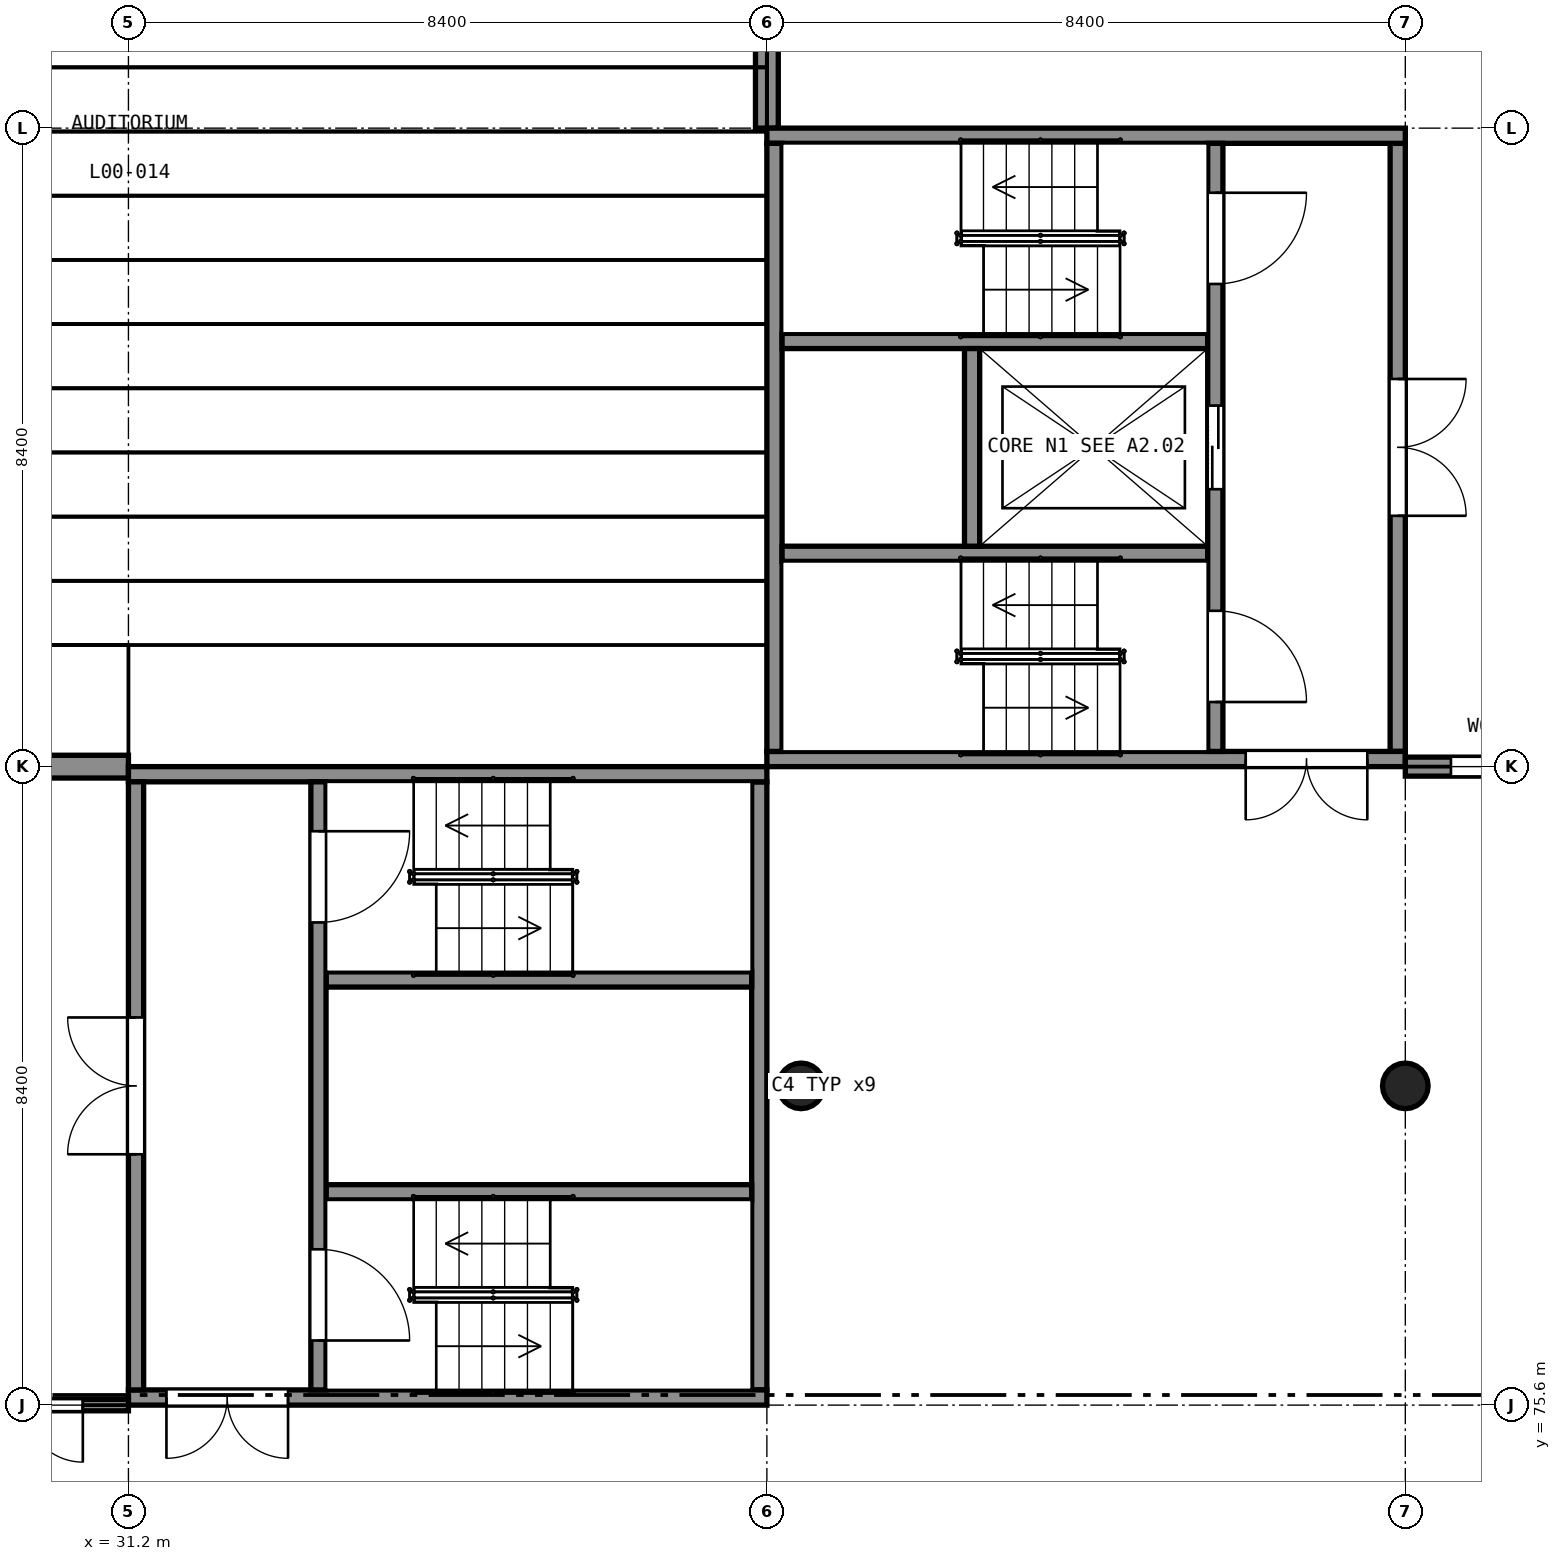
"""IFC4 building model, lengths in metres.
Left out: names, types, materials, properties, quantities, classifications, styles, units other than length and angle.
Written with IfcOpenShell. Run it as: python <this file> out.ifc"""

import sys

from ifc_helpers import new_model, si_unit, direction, frame, frame_2d, origin, origin_2d, place, context, subcontext, project, spatial, rectangle, circle, extrude, element, fill, save


model = new_model("IFC4")
c1 = context("Model", 3, precision=1e-05, world=origin(), true_north=direction((0.0, 1.0)))
c2 = subcontext(c1, "Body", "Model", "MODEL_VIEW")
j1 = project(units=[si_unit("LENGTHUNIT", "METRE"), si_unit("PLANEANGLEUNIT", "RADIAN")], contexts=[c1])
p1 = place(None, origin())
s1 = spatial("IfcSite", under=j1, at=p1, CompositionType="ELEMENT")
p2 = place(p1, origin())
s2 = spatial("IfcBuilding", under=s1, at=p2, CompositionType="ELEMENT")
p3 = place(p2, origin())
s3 = spatial("IfcBuildingStorey", under=s2, at=p3, CompositionType="ELEMENT", Elevation=0.0)
p4 = place(p3, frame((39.6, 75.7, -1.8), z_axis=(0.0, 0.0, 1.0), x_axis=(-1.0, 0.0, 0.0)))
e1 = element("IfcWall", 1, at=p4, inside=s3, PredefinedType="SHEAR", context=c2, shape_type="SweptSolid", body=[
    extrude(rectangle(XDim=8.4, YDim=0.2, at=frame_2d((4.2, 0.0))), origin(), (0.0, 0.0, 1.0), 7.3),
])
p5 = place(p4, frame((6.3, 0.0, 1.8)))
e2 = element("IfcOpeningElement", 2, at=p5, cuts=e1, PredefinedType="OPENING", context=c2, shape_type="SweptSolid", body=[
    extrude(rectangle(XDim=1.6, YDim=2.1, at=frame_2d((0.8, 1.05))), frame((0.0, 0.11, 0.0), z_axis=(0.0, -1.0, 0.0), x_axis=(1.0, 0.0, 0.0)), (0.0, 0.0, 1.0), 0.22),
])
p6 = place(p3, frame((31.2, 83.9, -1.8), z_axis=(0.0, 0.0, 1.0), x_axis=(1.0, 0.0, 0.0)))
e3 = element("IfcWall", 3, at=p6, inside=s3, PredefinedType="SHEAR", context=c2, shape_type="SweptSolid", body=[
    extrude(rectangle(XDim=8.4, YDim=0.2, at=frame_2d((4.2, 0.0))), origin(), (0.0, 0.0, 1.0), 7.3),
])
p7 = place(p3, frame((31.3, 75.8, -1.8), z_axis=(0.0, 0.0, 1.0), x_axis=(0.0, 1.0, 0.0)))
e4 = element("IfcWall", 4, at=p7, inside=s3, PredefinedType="SHEAR", context=c2, shape_type="SweptSolid", body=[
    extrude(rectangle(XDim=8.0, YDim=0.2, at=frame_2d((4.0, 0.0))), origin(), (0.0, 0.0, 1.0), 7.3),
])
p8 = place(p7, frame((3.1, 0.0, 1.8)))
e5 = element("IfcOpeningElement", 5, at=p8, cuts=e4, PredefinedType="OPENING", context=c2, shape_type="SweptSolid", body=[
    extrude(rectangle(XDim=1.8, YDim=2.1, at=frame_2d((0.9, 1.05))), frame((0.0, 0.11, 0.0), z_axis=(0.0, -1.0, 0.0), x_axis=(1.0, 0.0, 0.0)), (0.0, 0.0, 1.0), 0.22),
])
p9 = place(p3, frame((39.5, 75.8, -1.8), z_axis=(0.0, 0.0, 1.0), x_axis=(0.0, 1.0, 0.0)))
e6 = element("IfcWall", 6, at=p9, inside=s3, PredefinedType="SHEAR", context=c2, shape_type="SweptSolid", body=[
    extrude(rectangle(XDim=8.0, YDim=0.2, at=frame_2d((4.0, 0.0))), origin(), (0.0, 0.0, 1.0), 7.3),
])
p10 = place(p3, frame((33.7, 75.8, -1.8), z_axis=(0.0, 0.0, 1.0), x_axis=(0.0, 1.0, 0.0)))
e7 = element("IfcWall", 7, at=p10, inside=s3, PredefinedType="SHEAR", context=c2, shape_type="SweptSolid", body=[
    extrude(rectangle(XDim=8.0, YDim=0.2, at=frame_2d((4.0, 0.0))), origin(), (0.0, 0.0, 1.0), 7.3),
])
p11 = place(p10, frame((0.65, 0.0, 1.8)))
e8 = element("IfcOpeningElement", 8, at=p11, cuts=e7, PredefinedType="OPENING", context=c2, shape_type="SweptSolid", body=[
    extrude(rectangle(XDim=1.2, YDim=2.1, at=frame_2d((0.6, 1.05))), frame((0.0, 0.11, 0.0), z_axis=(0.0, -1.0, 0.0), x_axis=(1.0, 0.0, 0.0)), (0.0, 0.0, 1.0), 0.22),
])
p12 = place(p10, frame((6.15, 0.0, 1.8)))
e9 = element("IfcOpeningElement", 9, at=p12, cuts=e7, PredefinedType="OPENING", context=c2, shape_type="SweptSolid", body=[
    extrude(rectangle(XDim=1.2, YDim=2.1, at=frame_2d((0.6, 1.05))), frame((0.0, 0.11, 0.0), z_axis=(0.0, -1.0, 0.0), x_axis=(1.0, 0.0, 0.0)), (0.0, 0.0, 1.0), 0.22),
])
for number, where, z_axis, x_axis in (
    (10, (33.8, 78.4, -1.8), (0.0, 0.0, 1.0), (1.0, 0.0, 0.0)),
    (11, (33.8, 81.2, -1.8), (0.0, 0.0, 1.0), (1.0, 0.0, 0.0)),
):
    element("IfcWall", number, at=place(p3, frame(where, z_axis=z_axis, x_axis=x_axis)), inside=s3, PredefinedType="SHEAR", context=c2, shape_type="SweptSolid", body=[
        extrude(rectangle(XDim=5.6, YDim=0.2, at=frame_2d((2.8, 0.0))), origin(), (0.0, 0.0, 1.0), 7.3),
    ])
p13 = place(p3, frame((48.0, 84.1, -1.8), z_axis=(0.0, 0.0, 1.0), x_axis=(-1.0, 0.0, 0.0)))
e12 = element("IfcWall", 12, at=p13, inside=s3, PredefinedType="SHEAR", context=c2, shape_type="SweptSolid", body=[
    extrude(rectangle(XDim=8.4, YDim=0.2, at=frame_2d((4.2, 0.0))), origin(), (0.0, 0.0, 1.0), 7.3),
])
p14 = place(p13, frame((0.5, 0.0, 1.8)))
e13 = element("IfcOpeningElement", 13, at=p14, cuts=e12, PredefinedType="OPENING", context=c2, shape_type="SweptSolid", body=[
    extrude(rectangle(XDim=1.6, YDim=2.1, at=frame_2d((0.8, 1.05))), frame((0.0, 0.11, 0.0), z_axis=(0.0, -1.0, 0.0), x_axis=(1.0, 0.0, 0.0)), (0.0, 0.0, 1.0), 0.22),
])
p15 = place(p3, frame((39.6, 92.3, -1.8), z_axis=(0.0, 0.0, 1.0), x_axis=(1.0, 0.0, 0.0)))
e14 = element("IfcWall", 14, at=p15, inside=s3, PredefinedType="SHEAR", context=c2, shape_type="SweptSolid", body=[
    extrude(rectangle(XDim=8.4, YDim=0.2, at=frame_2d((4.2, 0.0))), origin(), (0.0, 0.0, 1.0), 7.3),
])
p16 = place(p3, frame((39.7, 84.2, -1.8), z_axis=(0.0, 0.0, 1.0), x_axis=(0.0, 1.0, 0.0)))
e15 = element("IfcWall", 15, at=p16, inside=s3, PredefinedType="SHEAR", context=c2, shape_type="SweptSolid", body=[
    extrude(rectangle(XDim=8.0, YDim=0.2, at=frame_2d((4.0, 0.0))), origin(), (0.0, 0.0, 1.0), 7.3),
])
p17 = place(p3, frame((47.9, 84.2, -1.8), z_axis=(0.0, 0.0, 1.0), x_axis=(0.0, 1.0, 0.0)))
e16 = element("IfcWall", 16, at=p17, inside=s3, PredefinedType="SHEAR", context=c2, shape_type="SweptSolid", body=[
    extrude(rectangle(XDim=8.0, YDim=0.2, at=frame_2d((4.0, 0.0))), origin(), (0.0, 0.0, 1.0), 7.3),
])
p18 = place(p17, frame((3.1, 0.0, 1.8)))
e17 = element("IfcOpeningElement", 17, at=p18, cuts=e16, PredefinedType="OPENING", context=c2, shape_type="SweptSolid", body=[
    extrude(rectangle(XDim=1.8, YDim=2.1, at=frame_2d((0.9, 1.05))), frame((0.0, 0.11, 0.0), z_axis=(0.0, -1.0, 0.0), x_axis=(1.0, 0.0, 0.0)), (0.0, 0.0, 1.0), 0.22),
])
p19 = place(p3, frame((45.5, 84.2, -1.8), z_axis=(0.0, 0.0, 1.0), x_axis=(0.0, 1.0, 0.0)))
e18 = element("IfcWall", 18, at=p19, inside=s3, PredefinedType="SHEAR", context=c2, shape_type="SweptSolid", body=[
    extrude(rectangle(XDim=8.0, YDim=0.2, at=frame_2d((4.0, 0.0))), origin(), (0.0, 0.0, 1.0), 7.3),
])
p20 = place(p19, frame((0.65, 0.0, 1.8)))
e19 = element("IfcOpeningElement", 19, at=p20, cuts=e18, PredefinedType="OPENING", context=c2, shape_type="SweptSolid", body=[
    extrude(rectangle(XDim=1.2, YDim=2.1, at=frame_2d((0.6, 1.05))), frame((0.0, 0.11, 0.0), z_axis=(0.0, -1.0, 0.0), x_axis=(1.0, 0.0, 0.0)), (0.0, 0.0, 1.0), 0.22),
])
p21 = place(p19, frame((6.15, 0.0, 1.8)))
e20 = element("IfcOpeningElement", 20, at=p21, cuts=e18, PredefinedType="OPENING", context=c2, shape_type="SweptSolid", body=[
    extrude(rectangle(XDim=1.2, YDim=2.1, at=frame_2d((0.6, 1.05))), frame((0.0, 0.11, 0.0), z_axis=(0.0, -1.0, 0.0), x_axis=(1.0, 0.0, 0.0)), (0.0, 0.0, 1.0), 0.22),
])
p22 = place(p19, frame((3.45, 0.0, 1.8)))
e21 = element("IfcOpeningElement", 21, at=p22, cuts=e18, PredefinedType="OPENING", context=c2, shape_type="SweptSolid", body=[
    extrude(rectangle(XDim=1.1, YDim=2.1, at=frame_2d((0.55, 1.05))), frame((0.0, 0.11, 0.0), z_axis=(0.0, -1.0, 0.0), x_axis=(1.0, 0.0, 0.0)), (0.0, 0.0, 1.0), 0.22),
])
for number, where, z_axis, x_axis in (
    (22, (39.8, 86.8, -1.8), (0.0, 0.0, 1.0), (1.0, 0.0, 0.0)),
    (23, (39.8, 89.6, -1.8), (0.0, 0.0, 1.0), (1.0, 0.0, 0.0)),
):
    element("IfcWall", number, at=place(p3, frame(where, z_axis=z_axis, x_axis=x_axis)), inside=s3, PredefinedType="SHEAR", context=c2, shape_type="SweptSolid", body=[
        extrude(rectangle(XDim=5.6, YDim=0.2, at=frame_2d((2.8, 0.0))), origin(), (0.0, 0.0, 1.0), 7.3),
    ])
p23 = place(p3, frame((42.3, 86.9, -1.8), z_axis=(0.0, 0.0, 1.0), x_axis=(0.0, 1.0, 0.0)))
e24 = element("IfcWall", 24, at=p23, inside=s3, PredefinedType="SHEAR", context=c2, shape_type="SweptSolid", body=[
    extrude(rectangle(XDim=2.6, YDim=0.2, at=frame_2d((1.3, 0.0))), origin(), (0.0, 0.0, 1.0), 7.3),
])
for number, where, z_axis, x_axis in (
    (25, (40.05, 79.8, -0.3), (0.0, 0.0, 1.0), (1.0, 0.0, 0.0)),
    (26, (48.0, 79.8, -0.3), (0.0, 0.0, 1.0), (1.0, 0.0, 0.0)),
):
    element("IfcColumn", number, at=place(p3, frame(where, z_axis=z_axis, x_axis=x_axis)), inside=s3, PredefinedType="COLUMN", context=c2, shape_type="SweptSolid", body=[
        extrude(circle(Radius=0.3, at=origin_2d()), origin(), (0.0, 0.0, 1.0), 5.8),
    ])
p24 = place(p3, frame((22.8, 75.6, 0.0), z_axis=(0.0, 0.0, 1.0), x_axis=(1.0, 0.0, 0.0)))
e27 = element("IfcWall", 27, at=p24, inside=s3, PredefinedType="ELEMENTEDWALL", context=c2, shape_type="SweptSolid", body=[
    extrude(rectangle(XDim=8.4, YDim=0.15, at=frame_2d((4.2, 0.0))), origin(), (0.0, 0.0, 1.0), 4.44),
])
p25 = place(p24, frame((4.8, 0.0, 0.0)))
e28 = element("IfcOpeningElement", 28, at=p25, cuts=e27, PredefinedType="OPENING", context=c2, shape_type="SweptSolid", body=[
    extrude(rectangle(XDim=1.5, YDim=2.4, at=frame_2d((0.75, 1.2))), frame((0.0, 0.085, 0.0), z_axis=(0.0, -1.0, 0.0), x_axis=(1.0, 0.0, 0.0)), (0.0, 0.0, 1.0), 0.17),
])
p26 = place(p24, frame((4.8, 0.0, 2.6)))
e29 = element("IfcOpeningElement", 29, at=p26, cuts=e27, PredefinedType="OPENING", context=c2, shape_type="SweptSolid", body=[
    extrude(rectangle(XDim=1.5, YDim=1.74, at=frame_2d((0.75, 0.87))), frame((0.0, 0.085, 0.0), z_axis=(0.0, -1.0, 0.0), x_axis=(1.0, 0.0, 0.0)), (0.0, 0.0, 1.0), 0.17),
])
p27 = place(p24, frame((6.3, 0.0, 0.0)))
e30 = element("IfcOpeningElement", 30, at=p27, cuts=e27, PredefinedType="OPENING", context=c2, shape_type="SweptSolid", body=[
    extrude(rectangle(XDim=1.5, YDim=2.4, at=frame_2d((0.75, 1.2))), frame((0.0, 0.085, 0.0), z_axis=(0.0, -1.0, 0.0), x_axis=(1.0, 0.0, 0.0)), (0.0, 0.0, 1.0), 0.17),
])
p28 = place(p24, frame((6.3, 0.0, 2.6)))
e31 = element("IfcOpeningElement", 31, at=p28, cuts=e27, PredefinedType="OPENING", context=c2, shape_type="SweptSolid", body=[
    extrude(rectangle(XDim=1.5, YDim=1.74, at=frame_2d((0.75, 0.87))), frame((0.0, 0.085, 0.0), z_axis=(0.0, -1.0, 0.0), x_axis=(1.0, 0.0, 0.0)), (0.0, 0.0, 1.0), 0.17),
])
p29 = place(p3, frame((48.0, 84.0, 0.0), z_axis=(0.0, 0.0, 1.0), x_axis=(1.0, 0.0, 0.0)))
e32 = element("IfcWall", 32, at=p29, inside=s3, PredefinedType="SOLIDWALL", context=c2, shape_type="SweptSolid", body=[
    extrude(rectangle(XDim=8.0, YDim=0.25, at=frame_2d((4.0, 0.0))), origin(), (0.0, 0.0, 1.0), 4.44),
])
p30 = place(p29, frame((0.6, 0.0, 0.9)))
e33 = element("IfcOpeningElement", 33, at=p30, cuts=e32, PredefinedType="OPENING", context=c2, shape_type="SweptSolid", body=[
    extrude(rectangle(XDim=1.2, YDim=2.1, at=frame_2d((0.6, 1.05))), frame((0.0, 0.135, 0.0), z_axis=(0.0, -1.0, 0.0), x_axis=(1.0, 0.0, 0.0)), (0.0, 0.0, 1.0), 0.27),
])
p31 = place(p29, frame((3.4, 0.0, 0.9)))
e34 = element("IfcOpeningElement", 34, at=p31, cuts=e32, PredefinedType="OPENING", context=c2, shape_type="SweptSolid", body=[
    extrude(rectangle(XDim=1.2, YDim=2.1, at=frame_2d((0.6, 1.05))), frame((0.0, 0.135, 0.0), z_axis=(0.0, -1.0, 0.0), x_axis=(1.0, 0.0, 0.0)), (0.0, 0.0, 1.0), 0.27),
])
p32 = place(p29, frame((6.2, 0.0, 0.9)))
e35 = element("IfcOpeningElement", 35, at=p32, cuts=e32, PredefinedType="OPENING", context=c2, shape_type="SweptSolid", body=[
    extrude(rectangle(XDim=1.2, YDim=2.1, at=frame_2d((0.6, 1.05))), frame((0.0, 0.135, 0.0), z_axis=(0.0, -1.0, 0.0), x_axis=(1.0, 0.0, 0.0)), (0.0, 0.0, 1.0), 0.27),
])
p33 = place(p3, frame((39.6, 92.4, 0.0), z_axis=(0.0, 0.0, 1.0), x_axis=(0.0, 1.0, 0.0)))
e36 = element("IfcWall", 36, at=p33, inside=s3, PredefinedType="PARTITIONING", context=c2, shape_type="SweptSolid", body=[
    extrude(rectangle(XDim=8.0, YDim=0.3, at=frame_2d((4.0, 0.0))), origin(), (0.0, 0.0, 1.0), 4.4),
])
p34 = place(p33, frame((1.325, 0.0, 0.0)))
e37 = element("IfcOpeningElement", 37, at=p34, cuts=e36, PredefinedType="OPENING", context=c2, shape_type="SweptSolid", body=[
    extrude(rectangle(XDim=1.8, YDim=2.1, at=frame_2d((0.9, 1.05))), frame((0.0, 0.16, 0.0), z_axis=(0.0, -1.0, 0.0), x_axis=(1.0, 0.0, 0.0)), (0.0, 0.0, 1.0), 0.32),
])
p35 = place(p33, frame((5.075, 0.0, 0.0)))
e38 = element("IfcOpeningElement", 38, at=p35, cuts=e36, PredefinedType="OPENING", context=c2, shape_type="SweptSolid", body=[
    extrude(rectangle(XDim=1.8, YDim=2.1, at=frame_2d((0.9, 1.05))), frame((0.0, 0.16, 0.0), z_axis=(0.0, -1.0, 0.0), x_axis=(1.0, 0.0, 0.0)), (0.0, 0.0, 1.0), 0.32),
])
p36 = place(p3, frame((24.4, 84.0, 0.0), z_axis=(0.0, 0.0, 1.0), x_axis=(1.0, 0.0, 0.0)))
e39 = element("IfcWall", 39, at=p36, inside=s3, PredefinedType="PARTITIONING", context=c2, shape_type="SweptSolid", body=[
    extrude(rectangle(XDim=6.8, YDim=0.3, at=frame_2d((3.4, 0.0))), origin(), (0.0, 0.0, 1.0), 4.4),
])
p37 = place(p36, frame((3.675, 0.0, 0.0)))
e40 = element("IfcOpeningElement", 40, at=p37, cuts=e39, PredefinedType="OPENING", context=c2, shape_type="SweptSolid", body=[
    extrude(rectangle(XDim=1.8, YDim=2.1, at=frame_2d((0.9, 1.05))), frame((0.0, 0.16, 0.0), z_axis=(0.0, -1.0, 0.0), x_axis=(1.0, 0.0, 0.0)), (0.0, 0.0, 1.0), 0.32),
])
p38 = place(p27, origin())
e41 = element("IfcDoor", 41, at=p38, inside=s3, OperationType="DOUBLE_DOOR_SINGLE_SWING", PredefinedType="DOOR", context=c2, shape_type="SweptSolid", body=[
    extrude(rectangle(XDim=1.5, YDim=2.4, at=frame_2d((0.75, 1.2))), frame((0.0, 0.025, 0.0), z_axis=(0.0, -1.0, 0.0), x_axis=(1.0, 0.0, 0.0)), (0.0, 0.0, 1.0), 0.05),
])
fill(e30, e41)
p39 = place(p28, origin())
e42 = element("IfcWindow", 42, at=p39, inside=s3, PartitioningType="SINGLE_PANEL", PredefinedType="WINDOW", context=c2, shape_type="SweptSolid", body=[
    extrude(rectangle(XDim=1.5, YDim=1.74, at=frame_2d((0.75, 0.87))), frame((0.0, 0.03, 0.0), z_axis=(0.0, -1.0, 0.0), x_axis=(1.0, 0.0, 0.0)), (0.0, 0.0, 1.0), 0.06),
])
fill(e31, e42)
p40 = place(p30, origin())
e43 = element("IfcWindow", 43, at=p40, inside=s3, PartitioningType="SINGLE_PANEL", PredefinedType="WINDOW", context=c2, shape_type="SweptSolid", body=[
    extrude(rectangle(XDim=1.2, YDim=2.1, at=frame_2d((0.6, 1.05))), frame((0.0, 0.105, 0.0), z_axis=(0.0, -1.0, 0.0), x_axis=(1.0, 0.0, 0.0)), (0.0, 0.0, 1.0), 0.06),
])
fill(e33, e43)
p41 = place(p5, origin())
e44 = element("IfcDoor", 44, at=p41, inside=s3, OperationType="DOUBLE_DOOR_SINGLE_SWING", PredefinedType="DOOR", context=c2, shape_type="SweptSolid", body=[
    extrude(rectangle(XDim=1.6, YDim=2.1, at=frame_2d((0.8, 1.05))), frame((0.0, 0.025, 0.0), z_axis=(0.0, -1.0, 0.0), x_axis=(1.0, 0.0, 0.0)), (0.0, 0.0, 1.0), 0.05),
])
fill(e2, e44)
p42 = place(p14, origin())
e45 = element("IfcDoor", 45, at=p42, inside=s3, OperationType="DOUBLE_DOOR_SINGLE_SWING", PredefinedType="DOOR", context=c2, shape_type="SweptSolid", body=[
    extrude(rectangle(XDim=1.6, YDim=2.1, at=frame_2d((0.8, 1.05))), frame((0.0, 0.025, 0.0), z_axis=(0.0, -1.0, 0.0), x_axis=(1.0, 0.0, 0.0)), (0.0, 0.0, 1.0), 0.05),
])
fill(e13, e45)
p43 = place(p8, origin())
e46 = element("IfcDoor", 46, at=p43, inside=s3, OperationType="DOUBLE_DOOR_SINGLE_SWING", PredefinedType="DOOR", context=c2, shape_type="SweptSolid", body=[
    extrude(rectangle(XDim=1.8, YDim=2.1, at=frame_2d((0.9, 1.05))), frame((0.0, 0.025, 0.0), z_axis=(0.0, -1.0, 0.0), x_axis=(1.0, 0.0, 0.0)), (0.0, 0.0, 1.0), 0.05),
])
fill(e5, e46)
p44 = place(p11, origin())
e47 = element("IfcDoor", 47, at=p44, inside=s3, OperationType="SINGLE_SWING_LEFT", PredefinedType="DOOR", context=c2, shape_type="SweptSolid", body=[
    extrude(rectangle(XDim=1.2, YDim=2.1, at=frame_2d((0.6, 1.05))), frame((0.0, 0.025, 0.0), z_axis=(0.0, -1.0, 0.0), x_axis=(1.0, 0.0, 0.0)), (0.0, 0.0, 1.0), 0.05),
])
fill(e8, e47)
p45 = place(p12, origin())
e48 = element("IfcDoor", 48, at=p45, inside=s3, OperationType="SINGLE_SWING_RIGHT", PredefinedType="DOOR", context=c2, shape_type="SweptSolid", body=[
    extrude(rectangle(XDim=1.2, YDim=2.1, at=frame_2d((0.6, 1.05))), frame((0.0, 0.025, 0.0), z_axis=(0.0, -1.0, 0.0), x_axis=(1.0, 0.0, 0.0)), (0.0, 0.0, 1.0), 0.05),
])
fill(e9, e48)
p46 = place(p18, origin())
e49 = element("IfcDoor", 49, at=p46, inside=s3, OperationType="DOUBLE_DOOR_SINGLE_SWING", PredefinedType="DOOR", context=c2, shape_type="SweptSolid", body=[
    extrude(rectangle(XDim=1.8, YDim=2.1, at=frame_2d((0.9, 1.05))), frame((0.0, 0.025, 0.0), z_axis=(0.0, -1.0, 0.0), x_axis=(1.0, 0.0, 0.0)), (0.0, 0.0, 1.0), 0.05),
])
fill(e17, e49)
p47 = place(p20, origin())
e50 = element("IfcDoor", 50, at=p47, inside=s3, OperationType="SINGLE_SWING_LEFT", PredefinedType="DOOR", context=c2, shape_type="SweptSolid", body=[
    extrude(rectangle(XDim=1.2, YDim=2.1, at=frame_2d((0.6, 1.05))), frame((0.0, 0.025, 0.0), z_axis=(0.0, -1.0, 0.0), x_axis=(1.0, 0.0, 0.0)), (0.0, 0.0, 1.0), 0.05),
])
fill(e19, e50)
p48 = place(p21, origin())
e51 = element("IfcDoor", 51, at=p48, inside=s3, OperationType="SINGLE_SWING_RIGHT", PredefinedType="DOOR", context=c2, shape_type="SweptSolid", body=[
    extrude(rectangle(XDim=1.2, YDim=2.1, at=frame_2d((0.6, 1.05))), frame((0.0, 0.025, 0.0), z_axis=(0.0, -1.0, 0.0), x_axis=(1.0, 0.0, 0.0)), (0.0, 0.0, 1.0), 0.05),
])
fill(e20, e51)
p49 = place(p22, origin())
e52 = element("IfcDoor", 52, at=p49, inside=s3, OperationType="DOUBLE_DOOR_SLIDING", PredefinedType="DOOR", context=c2, shape_type="SweptSolid", body=[
    extrude(rectangle(XDim=1.1, YDim=2.1, at=frame_2d((0.55, 1.05))), frame((0.0, 0.025, 0.0), z_axis=(0.0, -1.0, 0.0), x_axis=(1.0, 0.0, 0.0)), (0.0, 0.0, 1.0), 0.05),
])
fill(e21, e52)
save(model, sys.argv[1])
